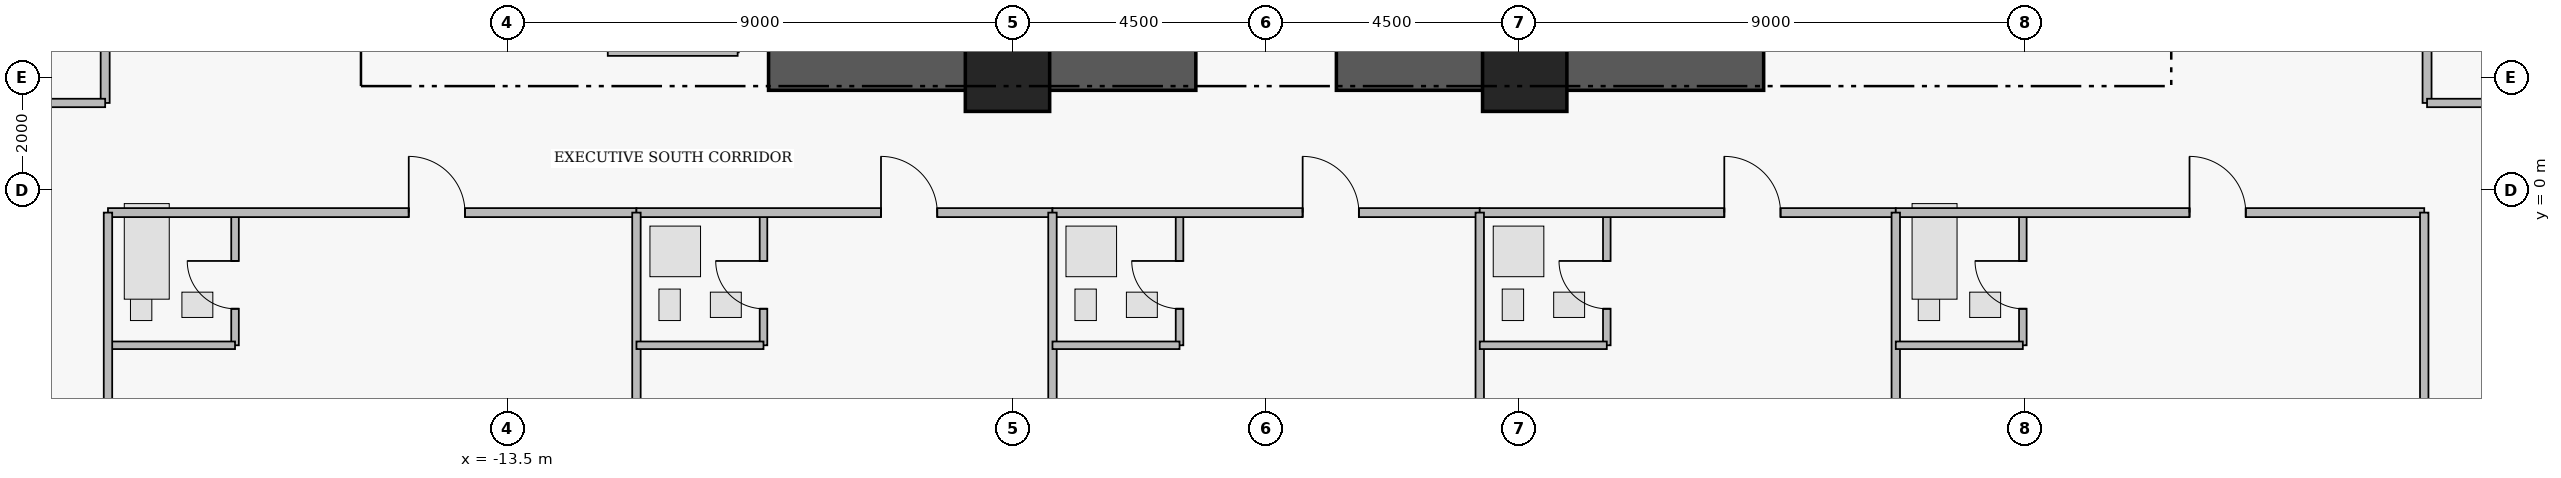
"""IFC4 building model, lengths in metres.
Left out: names, types, materials, properties, quantities, classifications, styles, units other than length and angle.
Written with IfcOpenShell. Run it as: python <this file> out.ifc"""

import sys

from ifc_helpers import new_model, si_unit, direction, frame, frame_2d, origin, origin_2d, place, context, subcontext, project, spatial, rectangle, extrude, element, fill, save


model = new_model("IFC4")
c1 = context("Model", 3, precision=1e-05, world=origin(), true_north=direction((0.0, 1.0)))
c2 = subcontext(c1, "Body", "Model", "MODEL_VIEW")
j1 = project(units=[si_unit("LENGTHUNIT", "METRE"), si_unit("PLANEANGLEUNIT", "RADIAN")], contexts=[c1])
p1 = place(None, origin())
s1 = spatial("IfcSite", under=j1, at=p1, CompositionType="ELEMENT")
p2 = place(p1, origin())
s2 = spatial("IfcBuilding", under=s1, at=p2, CompositionType="ELEMENT")
p3 = place(p2, frame((0.0, 0.0, 95.65)))
s3 = spatial("IfcBuildingStorey", under=s2, at=p3, CompositionType="ELEMENT", Elevation=95.65)
for number, where, z_axis, x_axis in (
    (1, (-8.85, 2.15, 0.0), (0.0, 0.0, 1.0), (1.0, 0.0, 0.0)),
    (2, (1.25, 2.15, 0.0), (0.0, 0.0, 1.0), (1.0, 0.0, 0.0)),
):
    element("IfcWall", number, at=place(p3, frame(where, z_axis=z_axis, x_axis=x_axis)), inside=s3, PredefinedType="SHEAR", context=c2, shape_type="SweptSolid", body=[
        extrude(rectangle(XDim=7.6, YDim=0.75, at=frame_2d((3.8, 0.0))), origin(), (0.0, 0.0, 1.0), 3.43),
    ])
for number, where, z_axis, x_axis in (
    (3, (-4.6, 2.15, 0.0), (0.0, 0.0, 1.0), (1.0, 0.0, 0.0)),
    (4, (4.6, 2.15, 0.0), (0.0, 0.0, 1.0), (1.0, 0.0, 0.0)),
):
    element("IfcColumn", number, at=place(p3, frame(where, z_axis=z_axis, x_axis=x_axis)), inside=s3, PredefinedType="COLUMN", context=c2, shape_type="SweptSolid", body=[
        extrude(rectangle(XDim=1.5, YDim=1.5, at=origin_2d()), origin(), (0.0, 0.0, 1.0), 3.65),
    ])
p4 = place(p3, frame((-18.34, -2.76, 0.0), z_axis=(0.0, 0.0, 1.0), x_axis=(0.0, 1.0, 0.0)))
e5 = element("IfcWall", 5, at=p4, inside=s3, PredefinedType="PLUMBINGWALL", context=c2, shape_type="SweptSolid", body=[
    extrude(rectangle(XDim=2.36, YDim=0.135, at=frame_2d((1.18, 0.0))), origin(), (0.0, 0.0, 1.0), 3.43),
])
p5 = place(p4, frame((0.65, 0.0, 0.0)))
e6 = element("IfcOpeningElement", 6, at=p5, cuts=e5, PredefinedType="OPENING", context=c2, shape_type="SweptSolid", body=[
    extrude(rectangle(XDim=0.85, YDim=2.1, at=frame_2d((0.425, 1.05))), frame((0.0, 0.077, 0.0), z_axis=(0.0, -1.0, 0.0), x_axis=(1.0, 0.0, 0.0)), (0.0, 0.0, 1.0), 0.155),
])
p6 = place(p3, frame((-20.6, -0.4, 0.0), z_axis=(0.0, 0.0, 1.0), x_axis=(1.0, 0.0, 0.0)))
e7 = element("IfcWall", 7, at=p6, inside=s3, PredefinedType="PARTITIONING", context=c2, shape_type="SweptSolid", body=[
    extrude(rectangle(XDim=9.4, YDim=0.16, at=frame_2d((4.7, 0.0))), origin(), (0.0, 0.0, 1.0), 3.43),
])
p7 = place(p6, frame((5.35, 0.0, 0.0)))
e8 = element("IfcOpeningElement", 8, at=p7, cuts=e7, PredefinedType="OPENING", context=c2, shape_type="SweptSolid", body=[
    extrude(rectangle(XDim=1.0, YDim=2.15, at=frame_2d((0.5, 1.075))), frame((0.0, 0.09, 0.0), z_axis=(0.0, -1.0, 0.0), x_axis=(1.0, 0.0, 0.0)), (0.0, 0.0, 1.0), 0.18),
])
p8 = place(p3, frame((-8.94, -2.76, 0.0), z_axis=(0.0, 0.0, 1.0), x_axis=(0.0, 1.0, 0.0)))
e9 = element("IfcWall", 9, at=p8, inside=s3, PredefinedType="PLUMBINGWALL", context=c2, shape_type="SweptSolid", body=[
    extrude(rectangle(XDim=2.36, YDim=0.135, at=frame_2d((1.18, 0.0))), origin(), (0.0, 0.0, 1.0), 3.43),
])
p9 = place(p8, frame((0.65, 0.0, 0.0)))
e10 = element("IfcOpeningElement", 10, at=p9, cuts=e9, PredefinedType="OPENING", context=c2, shape_type="SweptSolid", body=[
    extrude(rectangle(XDim=0.85, YDim=2.1, at=frame_2d((0.425, 1.05))), frame((0.0, 0.077, 0.0), z_axis=(0.0, -1.0, 0.0), x_axis=(1.0, 0.0, 0.0)), (0.0, 0.0, 1.0), 0.155),
])
p10 = place(p3, frame((-11.2, -0.4, 0.0), z_axis=(0.0, 0.0, 1.0), x_axis=(1.0, 0.0, 0.0)))
e11 = element("IfcWall", 11, at=p10, inside=s3, PredefinedType="PARTITIONING", context=c2, shape_type="SweptSolid", body=[
    extrude(rectangle(XDim=7.4, YDim=0.16, at=frame_2d((3.7, 0.0))), origin(), (0.0, 0.0, 1.0), 3.43),
])
p11 = place(p10, frame((4.35, 0.0, 0.0)))
e12 = element("IfcOpeningElement", 12, at=p11, cuts=e11, PredefinedType="OPENING", context=c2, shape_type="SweptSolid", body=[
    extrude(rectangle(XDim=1.0, YDim=2.15, at=frame_2d((0.5, 1.075))), frame((0.0, 0.09, 0.0), z_axis=(0.0, -1.0, 0.0), x_axis=(1.0, 0.0, 0.0)), (0.0, 0.0, 1.0), 0.18),
])
p12 = place(p3, frame((-1.54, -2.76, 0.0), z_axis=(0.0, 0.0, 1.0), x_axis=(0.0, 1.0, 0.0)))
e13 = element("IfcWall", 13, at=p12, inside=s3, PredefinedType="PLUMBINGWALL", context=c2, shape_type="SweptSolid", body=[
    extrude(rectangle(XDim=2.36, YDim=0.135, at=frame_2d((1.18, 0.0))), origin(), (0.0, 0.0, 1.0), 3.43),
])
p13 = place(p12, frame((0.65, 0.0, 0.0)))
e14 = element("IfcOpeningElement", 14, at=p13, cuts=e13, PredefinedType="OPENING", context=c2, shape_type="SweptSolid", body=[
    extrude(rectangle(XDim=0.85, YDim=2.1, at=frame_2d((0.425, 1.05))), frame((0.0, 0.077, 0.0), z_axis=(0.0, -1.0, 0.0), x_axis=(1.0, 0.0, 0.0)), (0.0, 0.0, 1.0), 0.155),
])
p14 = place(p3, frame((-3.8, -0.4, 0.0), z_axis=(0.0, 0.0, 1.0), x_axis=(1.0, 0.0, 0.0)))
e15 = element("IfcWall", 15, at=p14, inside=s3, PredefinedType="PARTITIONING", context=c2, shape_type="SweptSolid", body=[
    extrude(rectangle(XDim=7.6, YDim=0.16, at=frame_2d((3.8, 0.0))), origin(), (0.0, 0.0, 1.0), 3.43),
])
p15 = place(p14, frame((4.45, 0.0, 0.0)))
e16 = element("IfcOpeningElement", 16, at=p15, cuts=e15, PredefinedType="OPENING", context=c2, shape_type="SweptSolid", body=[
    extrude(rectangle(XDim=1.0, YDim=2.15, at=frame_2d((0.5, 1.075))), frame((0.0, 0.09, 0.0), z_axis=(0.0, -1.0, 0.0), x_axis=(1.0, 0.0, 0.0)), (0.0, 0.0, 1.0), 0.18),
])
p16 = place(p3, frame((6.06, -2.76, 0.0), z_axis=(0.0, 0.0, 1.0), x_axis=(0.0, 1.0, 0.0)))
e17 = element("IfcWall", 17, at=p16, inside=s3, PredefinedType="PLUMBINGWALL", context=c2, shape_type="SweptSolid", body=[
    extrude(rectangle(XDim=2.36, YDim=0.135, at=frame_2d((1.18, 0.0))), origin(), (0.0, 0.0, 1.0), 3.43),
])
p17 = place(p16, frame((0.65, 0.0, 0.0)))
e18 = element("IfcOpeningElement", 18, at=p17, cuts=e17, PredefinedType="OPENING", context=c2, shape_type="SweptSolid", body=[
    extrude(rectangle(XDim=0.85, YDim=2.1, at=frame_2d((0.425, 1.05))), frame((0.0, 0.077, 0.0), z_axis=(0.0, -1.0, 0.0), x_axis=(1.0, 0.0, 0.0)), (0.0, 0.0, 1.0), 0.155),
])
p18 = place(p3, frame((3.8, -0.4, 0.0), z_axis=(0.0, 0.0, 1.0), x_axis=(1.0, 0.0, 0.0)))
e19 = element("IfcWall", 19, at=p18, inside=s3, PredefinedType="PARTITIONING", context=c2, shape_type="SweptSolid", body=[
    extrude(rectangle(XDim=7.4, YDim=0.16, at=frame_2d((3.7, 0.0))), origin(), (0.0, 0.0, 1.0), 3.43),
])
p19 = place(p18, frame((4.35, 0.0, 0.0)))
e20 = element("IfcOpeningElement", 20, at=p19, cuts=e19, PredefinedType="OPENING", context=c2, shape_type="SweptSolid", body=[
    extrude(rectangle(XDim=1.0, YDim=2.15, at=frame_2d((0.5, 1.075))), frame((0.0, 0.09, 0.0), z_axis=(0.0, -1.0, 0.0), x_axis=(1.0, 0.0, 0.0)), (0.0, 0.0, 1.0), 0.18),
])
p20 = place(p3, frame((13.46, -2.76, 0.0), z_axis=(0.0, 0.0, 1.0), x_axis=(0.0, 1.0, 0.0)))
e21 = element("IfcWall", 21, at=p20, inside=s3, PredefinedType="PLUMBINGWALL", context=c2, shape_type="SweptSolid", body=[
    extrude(rectangle(XDim=2.36, YDim=0.135, at=frame_2d((1.18, 0.0))), origin(), (0.0, 0.0, 1.0), 2.747),
])
p21 = place(p20, frame((0.65, 0.0, 0.0)))
e22 = element("IfcOpeningElement", 22, at=p21, cuts=e21, PredefinedType="OPENING", context=c2, shape_type="SweptSolid", body=[
    extrude(rectangle(XDim=0.85, YDim=2.1, at=frame_2d((0.425, 1.05))), frame((0.0, 0.077, 0.0), z_axis=(0.0, -1.0, 0.0), x_axis=(1.0, 0.0, 0.0)), (0.0, 0.0, 1.0), 0.155),
])
p22 = place(p3, frame((11.2, -0.4, 0.0), z_axis=(0.0, 0.0, 1.0), x_axis=(1.0, 0.0, 0.0)))
e23 = element("IfcWall", 23, at=p22, inside=s3, PredefinedType="PARTITIONING", context=c2, shape_type="SweptSolid", body=[
    extrude(rectangle(XDim=9.4, YDim=0.16, at=frame_2d((4.7, 0.0))), origin(), (0.0, 0.0, 1.0), 3.43),
])
p23 = place(p22, frame((5.225, 0.0, 0.0)))
e24 = element("IfcOpeningElement", 24, at=p23, cuts=e23, PredefinedType="OPENING", context=c2, shape_type="SweptSolid", body=[
    extrude(rectangle(XDim=1.0, YDim=2.15, at=frame_2d((0.5, 1.075))), frame((0.0, 0.09, 0.0), z_axis=(0.0, -1.0, 0.0), x_axis=(1.0, 0.0, 0.0)), (0.0, 0.0, 1.0), 0.18),
])
p24 = place(p3, frame((20.65, 1.55, 0.0), z_axis=(0.0, 0.0, 1.0), x_axis=(0.0, 1.0, 0.0)))
e25 = element("IfcWall", 25, at=p24, inside=s3, PredefinedType="PARTITIONING", context=c2, shape_type="SweptSolid", body=[
    extrude(rectangle(XDim=6.25, YDim=0.16, at=frame_2d((3.125, 0.0))), origin(), (0.0, 0.0, 1.0), 3.43),
])
p25 = place(p24, frame((2.665, 0.0, 0.0)))
e26 = element("IfcOpeningElement", 26, at=p25, cuts=e25, PredefinedType="OPENING", context=c2, shape_type="SweptSolid", body=[
    extrude(rectangle(XDim=0.92, YDim=2.12, at=frame_2d((0.46, 1.06))), frame((0.0, 0.09, 0.0), z_axis=(0.0, -1.0, 0.0), x_axis=(1.0, 0.0, 0.0)), (0.0, 0.0, 1.0), 0.18),
])
p26 = place(p3, frame((-20.65, 1.55, 0.0), z_axis=(0.0, 0.0, 1.0), x_axis=(0.0, 1.0, 0.0)))
e27 = element("IfcWall", 27, at=p26, inside=s3, PredefinedType="PARTITIONING", context=c2, shape_type="SweptSolid", body=[
    extrude(rectangle(XDim=6.35, YDim=0.16, at=frame_2d((3.175, 0.0))), origin(), (0.0, 0.0, 1.0), 3.43),
])
p27 = place(p26, frame((2.7, 0.0, 0.0)))
e28 = element("IfcOpeningElement", 28, at=p27, cuts=e27, PredefinedType="OPENING", context=c2, shape_type="SweptSolid", body=[
    extrude(rectangle(XDim=0.95, YDim=2.15, at=frame_2d((0.475, 1.075))), frame((0.0, 0.09, 0.0), z_axis=(0.0, -1.0, 0.0), x_axis=(1.0, 0.0, 0.0)), (0.0, 0.0, 1.0), 0.18),
])
p28 = place(p3, frame((-11.71, 2.47, 0.0), z_axis=(0.0, 0.0, 1.0), x_axis=(1.0, 0.0, 0.0)))
e29 = element("IfcWall", 29, at=p28, inside=s3, PredefinedType="PARTITIONING", context=c2, shape_type="SweptSolid", body=[
    extrude(rectangle(XDim=2.31, YDim=0.165, at=frame_2d((1.155, 0.0))), origin(), (0.0, 0.0, 1.0), 2.03),
])
p29 = place(p3, frame((-20.6, -2.76, 0.0), z_axis=(0.0, 0.0, 1.0), x_axis=(1.0, 0.0, 0.0)))
e30 = element("IfcWall", 30, at=p29, inside=s3, PredefinedType="PLUMBINGWALL", context=c2, shape_type="SweptSolid", body=[
    extrude(rectangle(XDim=2.26, YDim=0.135, at=frame_2d((1.13, 0.0))), origin(), (0.0, 0.0, 1.0), 3.43),
])
p30 = place(p3, frame((-20.6, -11.9, 0.0), z_axis=(0.0, 0.0, 1.0), x_axis=(0.0, 1.0, 0.0)))
e31 = element("IfcWall", 31, at=p30, inside=s3, PredefinedType="PARTITIONING", context=c2, shape_type="SweptSolid", body=[
    extrude(rectangle(XDim=11.5, YDim=0.15, at=frame_2d((5.75, 0.0))), origin(), (0.0, 0.0, 1.0), 3.43),
])
p31 = place(p3, frame((-11.2, -15.32, 0.0), z_axis=(0.0, 0.0, 1.0), x_axis=(0.0, 1.0, 0.0)))
e32 = element("IfcWall", 32, at=p31, inside=s3, PredefinedType="PARTITIONING", context=c2, shape_type="SweptSolid", body=[
    extrude(rectangle(XDim=14.92, YDim=0.15, at=frame_2d((7.46, 0.0))), origin(), (0.0, 0.0, 1.0), 3.43),
])
p32 = place(p3, frame((-11.2, -2.76, 0.0), z_axis=(0.0, 0.0, 1.0), x_axis=(1.0, 0.0, 0.0)))
e33 = element("IfcWall", 33, at=p32, inside=s3, PredefinedType="PLUMBINGWALL", context=c2, shape_type="SweptSolid", body=[
    extrude(rectangle(XDim=2.26, YDim=0.135, at=frame_2d((1.13, 0.0))), origin(), (0.0, 0.0, 1.0), 3.43),
])
p33 = place(p3, frame((-3.8, -15.32, 0.0), z_axis=(0.0, 0.0, 1.0), x_axis=(0.0, 1.0, 0.0)))
e34 = element("IfcWall", 34, at=p33, inside=s3, PredefinedType="PARTITIONING", context=c2, shape_type="SweptSolid", body=[
    extrude(rectangle(XDim=14.92, YDim=0.15, at=frame_2d((7.46, 0.0))), origin(), (0.0, 0.0, 1.0), 3.43),
])
p34 = place(p3, frame((-3.8, -2.76, 0.0), z_axis=(0.0, 0.0, 1.0), x_axis=(1.0, 0.0, 0.0)))
e35 = element("IfcWall", 35, at=p34, inside=s3, PredefinedType="PLUMBINGWALL", context=c2, shape_type="SweptSolid", body=[
    extrude(rectangle(XDim=2.26, YDim=0.135, at=frame_2d((1.13, 0.0))), origin(), (0.0, 0.0, 1.0), 3.43),
])
p35 = place(p3, frame((3.8, -15.32, 0.0), z_axis=(0.0, 0.0, 1.0), x_axis=(0.0, 1.0, 0.0)))
e36 = element("IfcWall", 36, at=p35, inside=s3, PredefinedType="PARTITIONING", context=c2, shape_type="SweptSolid", body=[
    extrude(rectangle(XDim=14.92, YDim=0.15, at=frame_2d((7.46, 0.0))), origin(), (0.0, 0.0, 1.0), 3.43),
])
p36 = place(p3, frame((3.8, -2.76, 0.0), z_axis=(0.0, 0.0, 1.0), x_axis=(1.0, 0.0, 0.0)))
e37 = element("IfcWall", 37, at=p36, inside=s3, PredefinedType="PLUMBINGWALL", context=c2, shape_type="SweptSolid", body=[
    extrude(rectangle(XDim=2.26, YDim=0.135, at=frame_2d((1.13, 0.0))), origin(), (0.0, 0.0, 1.0), 3.43),
])
p37 = place(p3, frame((11.2, -15.32, 0.0), z_axis=(0.0, 0.0, 1.0), x_axis=(0.0, 1.0, 0.0)))
e38 = element("IfcWall", 38, at=p37, inside=s3, PredefinedType="PARTITIONING", context=c2, shape_type="SweptSolid", body=[
    extrude(rectangle(XDim=14.92, YDim=0.15, at=frame_2d((7.46, 0.0))), origin(), (0.0, 0.0, 1.0), 3.43),
])
p38 = place(p3, frame((11.2, -2.76, 0.0), z_axis=(0.0, 0.0, 1.0), x_axis=(1.0, 0.0, 0.0)))
e39 = element("IfcWall", 39, at=p38, inside=s3, PredefinedType="PLUMBINGWALL", context=c2, shape_type="SweptSolid", body=[
    extrude(rectangle(XDim=2.26, YDim=0.135, at=frame_2d((1.13, 0.0))), origin(), (0.0, 0.0, 1.0), 3.43),
])
p39 = place(p3, frame((20.6, -11.9, 0.0), z_axis=(0.0, 0.0, 1.0), x_axis=(0.0, 1.0, 0.0)))
e40 = element("IfcWall", 40, at=p39, inside=s3, PredefinedType="PARTITIONING", context=c2, shape_type="SweptSolid", body=[
    extrude(rectangle(XDim=11.5, YDim=0.15, at=frame_2d((5.75, 0.0))), origin(), (0.0, 0.0, 1.0), 3.43),
])
for number, where, z_axis, x_axis in (
    (41, (20.65, 1.55, 0.0), (0.0, 0.0, 1.0), (1.0, 0.0, 0.0)),
    (42, (-23.867, 1.55, 0.0), (0.0, 0.0, 1.0), (1.0, 0.0, 0.0)),
):
    element("IfcWall", number, at=place(p3, frame(where, z_axis=z_axis, x_axis=x_axis)), inside=s3, PredefinedType="PARTITIONING", context=c2, shape_type="SweptSolid", body=[
        extrude(rectangle(XDim=3.217, YDim=0.15, at=frame_2d((1.608, 0.0))), origin(), (0.0, 0.0, 1.0), 3.43),
    ])
p40 = place(p5, origin())
e43 = element("IfcDoor", 43, at=p40, inside=s3, OperationType="SINGLE_SWING_RIGHT", PredefinedType="DOOR", context=c2, shape_type="SweptSolid", body=[
    extrude(rectangle(XDim=0.85, YDim=2.1, at=frame_2d((0.425, 1.05))), frame((0.0, 0.025, 0.0), z_axis=(0.0, -1.0, 0.0), x_axis=(1.0, 0.0, 0.0)), (0.0, 0.0, 1.0), 0.05),
])
fill(e6, e43)
p41 = place(p7, origin())
e44 = element("IfcDoor", 44, at=p41, inside=s3, OperationType="SINGLE_SWING_LEFT", PredefinedType="DOOR", context=c2, shape_type="SweptSolid", body=[
    extrude(rectangle(XDim=1.0, YDim=2.15, at=frame_2d((0.5, 1.075))), frame((0.0, 0.025, 0.0), z_axis=(0.0, -1.0, 0.0), x_axis=(1.0, 0.0, 0.0)), (0.0, 0.0, 1.0), 0.05),
])
fill(e8, e44)
p42 = place(p9, origin())
e45 = element("IfcDoor", 45, at=p42, inside=s3, OperationType="SINGLE_SWING_RIGHT", PredefinedType="DOOR", context=c2, shape_type="SweptSolid", body=[
    extrude(rectangle(XDim=0.85, YDim=2.1, at=frame_2d((0.425, 1.05))), frame((0.0, 0.025, 0.0), z_axis=(0.0, -1.0, 0.0), x_axis=(1.0, 0.0, 0.0)), (0.0, 0.0, 1.0), 0.05),
])
fill(e10, e45)
p43 = place(p11, origin())
e46 = element("IfcDoor", 46, at=p43, inside=s3, OperationType="SINGLE_SWING_LEFT", PredefinedType="DOOR", context=c2, shape_type="SweptSolid", body=[
    extrude(rectangle(XDim=1.0, YDim=2.15, at=frame_2d((0.5, 1.075))), frame((0.0, 0.025, 0.0), z_axis=(0.0, -1.0, 0.0), x_axis=(1.0, 0.0, 0.0)), (0.0, 0.0, 1.0), 0.05),
])
fill(e12, e46)
p44 = place(p13, origin())
e47 = element("IfcDoor", 47, at=p44, inside=s3, OperationType="SINGLE_SWING_RIGHT", PredefinedType="DOOR", context=c2, shape_type="SweptSolid", body=[
    extrude(rectangle(XDim=0.85, YDim=2.1, at=frame_2d((0.425, 1.05))), frame((0.0, 0.025, 0.0), z_axis=(0.0, -1.0, 0.0), x_axis=(1.0, 0.0, 0.0)), (0.0, 0.0, 1.0), 0.05),
])
fill(e14, e47)
p45 = place(p15, origin())
e48 = element("IfcDoor", 48, at=p45, inside=s3, OperationType="SINGLE_SWING_LEFT", PredefinedType="DOOR", context=c2, shape_type="SweptSolid", body=[
    extrude(rectangle(XDim=1.0, YDim=2.15, at=frame_2d((0.5, 1.075))), frame((0.0, 0.025, 0.0), z_axis=(0.0, -1.0, 0.0), x_axis=(1.0, 0.0, 0.0)), (0.0, 0.0, 1.0), 0.05),
])
fill(e16, e48)
p46 = place(p17, origin())
e49 = element("IfcDoor", 49, at=p46, inside=s3, OperationType="SINGLE_SWING_RIGHT", PredefinedType="DOOR", context=c2, shape_type="SweptSolid", body=[
    extrude(rectangle(XDim=0.85, YDim=2.1, at=frame_2d((0.425, 1.05))), frame((0.0, 0.025, 0.0), z_axis=(0.0, -1.0, 0.0), x_axis=(1.0, 0.0, 0.0)), (0.0, 0.0, 1.0), 0.05),
])
fill(e18, e49)
p47 = place(p19, origin())
e50 = element("IfcDoor", 50, at=p47, inside=s3, OperationType="SINGLE_SWING_LEFT", PredefinedType="DOOR", context=c2, shape_type="SweptSolid", body=[
    extrude(rectangle(XDim=1.0, YDim=2.15, at=frame_2d((0.5, 1.075))), frame((0.0, 0.025, 0.0), z_axis=(0.0, -1.0, 0.0), x_axis=(1.0, 0.0, 0.0)), (0.0, 0.0, 1.0), 0.05),
])
fill(e20, e50)
p48 = place(p21, origin())
e51 = element("IfcDoor", 51, at=p48, inside=s3, OperationType="SINGLE_SWING_RIGHT", PredefinedType="DOOR", context=c2, shape_type="SweptSolid", body=[
    extrude(rectangle(XDim=0.85, YDim=2.1, at=frame_2d((0.425, 1.05))), frame((0.0, 0.025, 0.0), z_axis=(0.0, -1.0, 0.0), x_axis=(1.0, 0.0, 0.0)), (0.0, 0.0, 1.0), 0.05),
])
fill(e22, e51)
p49 = place(p23, origin())
e52 = element("IfcDoor", 52, at=p49, inside=s3, OperationType="SINGLE_SWING_LEFT", PredefinedType="DOOR", context=c2, shape_type="SweptSolid", body=[
    extrude(rectangle(XDim=1.0, YDim=2.15, at=frame_2d((0.5, 1.075))), frame((0.0, 0.025, 0.0), z_axis=(0.0, -1.0, 0.0), x_axis=(1.0, 0.0, 0.0)), (0.0, 0.0, 1.0), 0.05),
])
fill(e24, e52)
save(model, sys.argv[1])
